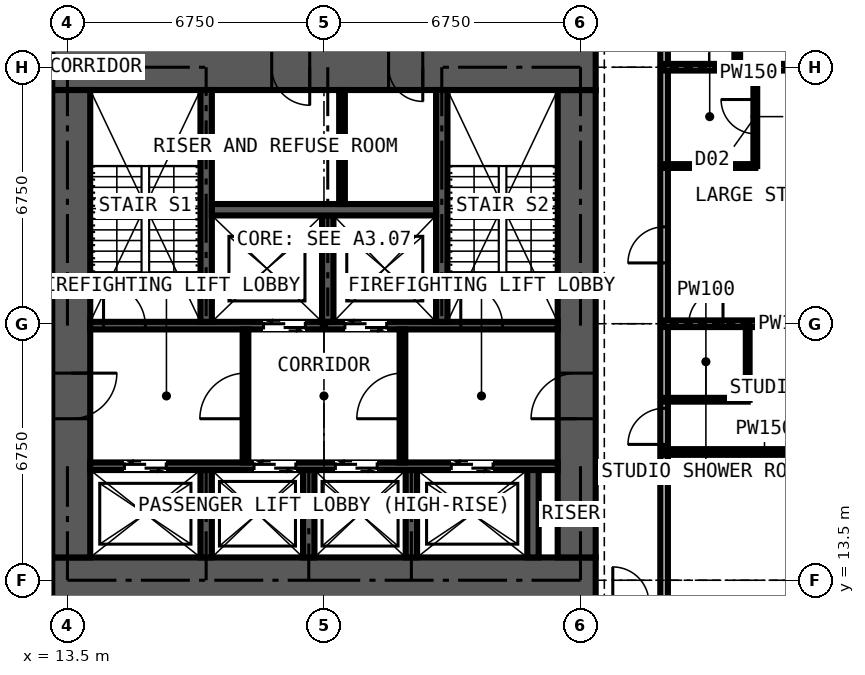
"""IFC4 building model, lengths in metres.
Left out: names, types, materials, properties, quantities, classifications, styles, units other than length and angle.
Written with IfcOpenShell. Run it as: python <this file> out.ifc"""

import sys

from ifc_helpers import new_model, si_unit, direction, frame, frame_2d, origin, place, context, subcontext, project, spatial, rectangle, extrude, element, fill, save


model = new_model("IFC4")
c1 = context("Model", 3, precision=1e-05, world=origin(), true_north=direction((0.0, 1.0)))
c2 = subcontext(c1, "Body", "Model", "MODEL_VIEW")
j1 = project(units=[si_unit("LENGTHUNIT", "METRE"), si_unit("PLANEANGLEUNIT", "RADIAN")], contexts=[c1])
p1 = place(None, origin())
s1 = spatial("IfcSite", under=j1, at=p1, CompositionType="ELEMENT")
p2 = place(p1, origin())
s2 = spatial("IfcBuilding", under=s1, at=p2, CompositionType="ELEMENT")
p3 = place(p2, frame((0.0, 0.0, 178.2)))
s3 = spatial("IfcBuildingStorey", under=s2, at=p3, CompositionType="ELEMENT", Elevation=178.2)
p4 = place(p3, frame((13.1, 13.5, 0.0), z_axis=(0.0, 0.0, 1.0), x_axis=(1.0, 0.0, 0.0)))
e1 = element("IfcWall", 1, at=p4, inside=s3, PredefinedType="SHEAR", context=c2, shape_type="SweptSolid", body=[
    extrude(rectangle(XDim=14.3, YDim=1.2, at=frame_2d((7.15, 0.0))), origin(), (0.0, 0.0, 1.0), 3.6),
])
p5 = place(p3, frame((26.9, 14.1, 0.0), z_axis=(0.0, 0.0, 1.0), x_axis=(0.0, 1.0, 0.0)))
e2 = element("IfcWall", 2, at=p5, inside=s3, PredefinedType="SHEAR", context=c2, shape_type="SweptSolid", body=[
    extrude(rectangle(XDim=12.3, YDim=1.0, at=frame_2d((6.15, 0.0))), origin(), (0.0, 0.0, 1.0), 3.6),
])
p6 = place(p5, frame((3.65, 0.0, 0.0)))
e3 = element("IfcOpeningElement", 3, at=p6, cuts=e2, PredefinedType="OPENING", context=c2, shape_type="SweptSolid", body=[
    extrude(rectangle(XDim=1.2, YDim=2.2, at=frame_2d((0.6, 1.1))), frame((0.0, 0.51, 0.0), z_axis=(0.0, -1.0, 0.0), x_axis=(1.0, 0.0, 0.0)), (0.0, 0.0, 1.0), 1.02),
])
p7 = place(p3, frame((27.4, 27.0, 0.0), z_axis=(0.0, 0.0, 1.0), x_axis=(-1.0, 0.0, 0.0)))
e4 = element("IfcWall", 4, at=p7, inside=s3, PredefinedType="SHEAR", context=c2, shape_type="SweptSolid", body=[
    extrude(rectangle(XDim=14.3, YDim=1.2, at=frame_2d((7.15, 0.0))), origin(), (0.0, 0.0, 1.0), 3.6),
])
p8 = place(p7, frame((4.55, 0.0, 0.0)))
e5 = element("IfcOpeningElement", 5, at=p8, cuts=e4, PredefinedType="OPENING", context=c2, shape_type="SweptSolid", body=[
    extrude(rectangle(XDim=0.9, YDim=2.2, at=frame_2d((0.45, 1.1))), frame((0.0, 0.61, 0.0), z_axis=(0.0, -1.0, 0.0), x_axis=(1.0, 0.0, 0.0)), (0.0, 0.0, 1.0), 1.22),
])
p9 = place(p7, frame((7.525, 0.0, 0.0)))
e6 = element("IfcOpeningElement", 6, at=p9, cuts=e4, PredefinedType="OPENING", context=c2, shape_type="SweptSolid", body=[
    extrude(rectangle(XDim=1.0, YDim=2.2, at=frame_2d((0.5, 1.1))), frame((0.0, 0.61, 0.0), z_axis=(0.0, -1.0, 0.0), x_axis=(1.0, 0.0, 0.0)), (0.0, 0.0, 1.0), 1.22),
])
p10 = place(p3, frame((13.6, 26.4, 0.0), z_axis=(0.0, 0.0, 1.0), x_axis=(0.0, -1.0, 0.0)))
e7 = element("IfcWall", 7, at=p10, inside=s3, PredefinedType="SHEAR", context=c2, shape_type="SweptSolid", body=[
    extrude(rectangle(XDim=12.3, YDim=1.0, at=frame_2d((6.15, 0.0))), origin(), (0.0, 0.0, 1.0), 3.6),
])
p11 = place(p10, frame((7.45, 0.0, 0.0)))
e8 = element("IfcOpeningElement", 8, at=p11, cuts=e7, PredefinedType="OPENING", context=c2, shape_type="SweptSolid", body=[
    extrude(rectangle(XDim=1.2, YDim=2.2, at=frame_2d((0.6, 1.1))), frame((0.0, 0.51, 0.0), z_axis=(0.0, -1.0, 0.0), x_axis=(1.0, 0.0, 0.0)), (0.0, 0.0, 1.0), 1.02),
])
p12 = place(p3, frame((14.1, 16.5, 0.0), z_axis=(0.0, 0.0, 1.0), x_axis=(1.0, 0.0, 0.0)))
e9 = element("IfcWall", 9, at=p12, inside=s3, PredefinedType="SHEAR", context=c2, shape_type="SweptSolid", body=[
    extrude(rectangle(XDim=12.3, YDim=0.2, at=frame_2d((6.15, 0.0))), origin(), (0.0, 0.0, 1.0), 3.6),
])
p13 = place(p12, frame((0.9, 0.0, 0.0)))
e10 = element("IfcOpeningElement", 10, at=p13, cuts=e9, PredefinedType="OPENING", context=c2, shape_type="SweptSolid", body=[
    extrude(rectangle(XDim=1.1, YDim=2.2, at=frame_2d((0.55, 1.1))), frame((0.0, 0.11, 0.0), z_axis=(0.0, -1.0, 0.0), x_axis=(1.0, 0.0, 0.0)), (0.0, 0.0, 1.0), 0.22),
])
p14 = place(p12, frame((4.31, 0.0, 0.0)))
e11 = element("IfcOpeningElement", 11, at=p14, cuts=e9, PredefinedType="OPENING", context=c2, shape_type="SweptSolid", body=[
    extrude(rectangle(XDim=1.1, YDim=2.2, at=frame_2d((0.55, 1.1))), frame((0.0, 0.11, 0.0), z_axis=(0.0, -1.0, 0.0), x_axis=(1.0, 0.0, 0.0)), (0.0, 0.0, 1.0), 0.22),
])
p15 = place(p12, frame((6.45, 0.0, 0.0)))
e12 = element("IfcOpeningElement", 12, at=p15, cuts=e9, PredefinedType="OPENING", context=c2, shape_type="SweptSolid", body=[
    extrude(rectangle(XDim=1.1, YDim=2.2, at=frame_2d((0.55, 1.1))), frame((0.0, 0.11, 0.0), z_axis=(0.0, -1.0, 0.0), x_axis=(1.0, 0.0, 0.0)), (0.0, 0.0, 1.0), 0.22),
])
p16 = place(p12, frame((9.5, 0.0, 0.0)))
e13 = element("IfcOpeningElement", 13, at=p16, cuts=e9, PredefinedType="OPENING", context=c2, shape_type="SweptSolid", body=[
    extrude(rectangle(XDim=1.1, YDim=2.2, at=frame_2d((0.55, 1.1))), frame((0.0, 0.11, 0.0), z_axis=(0.0, -1.0, 0.0), x_axis=(1.0, 0.0, 0.0)), (0.0, 0.0, 1.0), 0.22),
])
p17 = place(p3, frame((14.1, 20.2, 0.0), z_axis=(0.0, 0.0, 1.0), x_axis=(1.0, 0.0, 0.0)))
e14 = element("IfcWall", 14, at=p17, inside=s3, PredefinedType="SHEAR", context=c2, shape_type="SweptSolid", body=[
    extrude(rectangle(XDim=12.3, YDim=0.2, at=frame_2d((6.15, 0.0))), origin(), (0.0, 0.0, 1.0), 3.6),
])
p18 = place(p17, frame((4.56, 0.0, 0.0)))
e15 = element("IfcOpeningElement", 15, at=p18, cuts=e14, PredefinedType="OPENING", context=c2, shape_type="SweptSolid", body=[
    extrude(rectangle(XDim=1.1, YDim=2.2, at=frame_2d((0.55, 1.1))), frame((0.0, 0.11, 0.0), z_axis=(0.0, -1.0, 0.0), x_axis=(1.0, 0.0, 0.0)), (0.0, 0.0, 1.0), 0.22),
])
p19 = place(p17, frame((6.7, 0.0, 0.0)))
e16 = element("IfcOpeningElement", 16, at=p19, cuts=e14, PredefinedType="OPENING", context=c2, shape_type="SweptSolid", body=[
    extrude(rectangle(XDim=1.1, YDim=2.2, at=frame_2d((0.55, 1.1))), frame((0.0, 0.11, 0.0), z_axis=(0.0, -1.0, 0.0), x_axis=(1.0, 0.0, 0.0)), (0.0, 0.0, 1.0), 0.22),
])
p20 = place(p17, frame((0.35, 0.0, 0.0)))
e17 = element("IfcOpeningElement", 17, at=p20, cuts=e14, PredefinedType="OPENING", context=c2, shape_type="SweptSolid", body=[
    extrude(rectangle(XDim=1.1, YDim=2.2, at=frame_2d((0.55, 1.1))), frame((0.0, 0.11, 0.0), z_axis=(0.0, -1.0, 0.0), x_axis=(1.0, 0.0, 0.0)), (0.0, 0.0, 1.0), 0.22),
])
p21 = place(p17, frame((9.75, 0.0, 0.0)))
e18 = element("IfcOpeningElement", 18, at=p21, cuts=e14, PredefinedType="OPENING", context=c2, shape_type="SweptSolid", body=[
    extrude(rectangle(XDim=1.1, YDim=2.2, at=frame_2d((0.55, 1.1))), frame((0.0, 0.11, 0.0), z_axis=(0.0, -1.0, 0.0), x_axis=(1.0, 0.0, 0.0)), (0.0, 0.0, 1.0), 0.22),
])
for number, where, z_axis, x_axis in (
    (19, (17.15, 20.3, 0.0), (0.0, 0.0, 1.0), (0.0, 1.0, 0.0)),
    (20, (23.35, 20.3, 0.0), (0.0, 0.0, 1.0), (0.0, 1.0, 0.0)),
):
    element("IfcWall", number, at=place(p3, frame(where, z_axis=z_axis, x_axis=x_axis)), inside=s3, PredefinedType="SHEAR", context=c2, shape_type="SweptSolid", body=[
        extrude(rectangle(XDim=6.1, YDim=0.3, at=frame_2d((3.05, 0.0))), origin(), (0.0, 0.0, 1.0), 3.6),
    ])
p22 = place(p3, frame((20.35, 20.3, 0.0), z_axis=(0.0, 0.0, 1.0), x_axis=(0.0, 1.0, 0.0)))
e21 = element("IfcWall", 21, at=p22, inside=s3, PredefinedType="SHEAR", context=c2, shape_type="SweptSolid", body=[
    extrude(rectangle(XDim=2.8, YDim=0.3, at=frame_2d((1.4, 0.0))), origin(), (0.0, 0.0, 1.0), 3.6),
])
p23 = place(p3, frame((17.3, 23.25, 0.0), z_axis=(0.0, 0.0, 1.0), x_axis=(1.0, 0.0, 0.0)))
e22 = element("IfcWall", 22, at=p23, inside=s3, PredefinedType="SHEAR", context=c2, shape_type="SweptSolid", body=[
    extrude(rectangle(XDim=5.9, YDim=0.3, at=frame_2d((2.95, 0.0))), origin(), (0.0, 0.0, 1.0), 3.6),
])
for number, where, z_axis, x_axis in (
    (23, (17.15, 14.1, 0.0), (0.0, 0.0, 1.0), (0.0, 1.0, 0.0)),
    (24, (19.85, 14.1, 0.0), (0.0, 0.0, 1.0), (0.0, 1.0, 0.0)),
    (25, (22.55, 14.1, 0.0), (0.0, 0.0, 1.0), (0.0, 1.0, 0.0)),
    (26, (25.75, 14.1, 0.0), (0.0, 0.0, 1.0), (0.0, 1.0, 0.0)),
):
    element("IfcWall", number, at=place(p3, frame(where, z_axis=z_axis, x_axis=x_axis)), inside=s3, PredefinedType="SHEAR", context=c2, shape_type="SweptSolid", body=[
        extrude(rectangle(XDim=2.3, YDim=0.3, at=frame_2d((1.15, 0.0))), origin(), (0.0, 0.0, 1.0), 3.6),
    ])
p24 = place(p3, frame((18.185, 16.6, 0.0), z_axis=(0.0, 0.0, 1.0), x_axis=(0.0, 1.0, 0.0)))
e27 = element("IfcWall", 27, at=p24, inside=s3, PredefinedType="PARTITIONING", context=c2, shape_type="SweptSolid", body=[
    extrude(rectangle(XDim=3.5, YDim=0.15, at=frame_2d((1.75, 0.0))), origin(), (0.0, 0.0, 1.0), 3.375),
])
p25 = place(p24, frame((1.15, 0.0, 0.0)))
e28 = element("IfcOpeningElement", 28, at=p25, cuts=e27, PredefinedType="OPENING", context=c2, shape_type="SweptSolid", body=[
    extrude(rectangle(XDim=1.2, YDim=2.2, at=frame_2d((0.6, 1.1))), frame((0.0, 0.085, 0.0), z_axis=(0.0, -1.0, 0.0), x_axis=(1.0, 0.0, 0.0)), (0.0, 0.0, 1.0), 0.17),
])
p26 = place(p3, frame((22.315, 16.6, 0.0), z_axis=(0.0, 0.0, 1.0), x_axis=(0.0, 1.0, 0.0)))
e29 = element("IfcWall", 29, at=p26, inside=s3, PredefinedType="PARTITIONING", context=c2, shape_type="SweptSolid", body=[
    extrude(rectangle(XDim=3.5, YDim=0.15, at=frame_2d((1.75, 0.0))), origin(), (0.0, 0.0, 1.0), 3.375),
])
p27 = place(p26, frame((1.15, 0.0, 0.0)))
e30 = element("IfcOpeningElement", 30, at=p27, cuts=e29, PredefinedType="OPENING", context=c2, shape_type="SweptSolid", body=[
    extrude(rectangle(XDim=1.2, YDim=2.2, at=frame_2d((0.6, 1.1))), frame((0.0, 0.085, 0.0), z_axis=(0.0, -1.0, 0.0), x_axis=(1.0, 0.0, 0.0)), (0.0, 0.0, 1.0), 0.17),
])
p28 = place(p3, frame((20.725, 23.4, 0.0), z_axis=(0.0, 0.0, 1.0), x_axis=(0.0, 1.0, 0.0)))
e31 = element("IfcWall", 31, at=p28, inside=s3, PredefinedType="PARTITIONING", context=c2, shape_type="SweptSolid", body=[
    extrude(rectangle(XDim=3.0, YDim=0.15, at=frame_2d((1.5, 0.0))), origin(), (0.0, 0.0, 1.0), 3.375),
])
p29 = place(p3, frame((29.2, 11.3, 0.0), z_axis=(0.0, 0.0, 1.0), x_axis=(0.0, 1.0, 0.0)))
e32 = element("IfcWall", 32, at=p29, inside=s3, PredefinedType="PARTITIONING", context=c2, shape_type="SweptSolid", body=[
    extrude(rectangle(XDim=17.9, YDim=0.2, at=frame_2d((8.95, 0.0))), origin(), (0.0, 0.0, 1.0), 3.375),
])
p30 = place(p29, frame((10.55, 0.0, 0.0)))
e33 = element("IfcOpeningElement", 33, at=p30, cuts=e32, PredefinedType="OPENING", context=c2, shape_type="SweptSolid", body=[
    extrude(rectangle(XDim=0.95, YDim=2.2, at=frame_2d((0.475, 1.1))), frame((0.0, 0.11, 0.0), z_axis=(0.0, -1.0, 0.0), x_axis=(1.0, 0.0, 0.0)), (0.0, 0.0, 1.0), 0.22),
])
p31 = place(p29, frame((5.775, 0.0, 0.0)))
e34 = element("IfcOpeningElement", 34, at=p31, cuts=e32, PredefinedType="OPENING", context=c2, shape_type="SweptSolid", body=[
    extrude(rectangle(XDim=0.95, YDim=2.2, at=frame_2d((0.475, 1.1))), frame((0.0, 0.11, 0.0), z_axis=(0.0, -1.0, 0.0), x_axis=(1.0, 0.0, 0.0)), (0.0, 0.0, 1.0), 0.22),
])
p32 = place(p29, frame((16.3, 0.0, 0.0)))
e35 = element("IfcOpeningElement", 35, at=p32, cuts=e32, PredefinedType="OPENING", context=c2, shape_type="SweptSolid", body=[
    extrude(rectangle(XDim=1.0, YDim=2.2, at=frame_2d((0.5, 1.1))), frame((0.0, 0.11, 0.0), z_axis=(0.0, -1.0, 0.0), x_axis=(1.0, 0.0, 0.0)), (0.0, 0.0, 1.0), 0.22),
])
p33 = place(p3, frame((29.2, 16.875, 0.0), z_axis=(0.0, 0.0, 1.0), x_axis=(1.0, 0.0, 0.0)))
e36 = element("IfcWall", 36, at=p33, inside=s3, PredefinedType="PARTITIONING", context=c2, shape_type="SweptSolid", body=[
    extrude(rectangle(XDim=5.284, YDim=0.15, at=frame_2d((2.642, 0.0))), origin(), (0.0, 0.0, 1.0), 3.375),
])
p34 = place(p3, frame((29.2, 18.25, 0.0), z_axis=(0.0, 0.0, 1.0), x_axis=(1.0, 0.0, 0.0)))
e37 = element("IfcWall", 37, at=p34, inside=s3, PredefinedType="PARTITIONING", context=c2, shape_type="SweptSolid", body=[
    extrude(rectangle(XDim=2.2, YDim=0.1, at=frame_2d((1.1, 0.0))), origin(), (0.0, 0.0, 1.0), 3.375),
])
p35 = place(p3, frame((29.2, 20.25, 0.0), z_axis=(0.0, 0.0, 1.0), x_axis=(1.0, 0.0, 0.0)))
e38 = element("IfcWall", 38, at=p35, inside=s3, PredefinedType="PARTITIONING", context=c2, shape_type="SweptSolid", body=[
    extrude(rectangle(XDim=5.284, YDim=0.175, at=frame_2d((2.642, 0.0))), origin(), (0.0, 0.0, 1.0), 2.806),
])
p36 = place(p35, frame((0.65, 0.0, 0.0)))
e39 = element("IfcOpeningElement", 39, at=p36, cuts=e38, PredefinedType="OPENING", context=c2, shape_type="SweptSolid", body=[
    extrude(rectangle(XDim=0.9, YDim=2.2, at=frame_2d((0.45, 1.1))), frame((0.0, 0.097, 0.0), z_axis=(0.0, -1.0, 0.0), x_axis=(1.0, 0.0, 0.0)), (0.0, 0.0, 1.0), 0.195),
])
p37 = place(p3, frame((29.2, 24.4, 0.0), z_axis=(0.0, 0.0, 1.0), x_axis=(1.0, 0.0, 0.0)))
e40 = element("IfcWall", 40, at=p37, inside=s3, PredefinedType="PARTITIONING", context=c2, shape_type="SweptSolid", body=[
    extrude(rectangle(XDim=2.4, YDim=0.1, at=frame_2d((1.2, 0.0))), origin(), (0.0, 0.0, 1.0), 3.375),
])
p38 = place(p3, frame((29.2, 27.0, 0.0), z_axis=(0.0, 0.0, 1.0), x_axis=(1.0, 0.0, 0.0)))
e41 = element("IfcWall", 41, at=p38, inside=s3, PredefinedType="PARTITIONING", context=c2, shape_type="SweptSolid", body=[
    extrude(rectangle(XDim=5.284, YDim=0.175, at=frame_2d((2.642, 0.0))), origin(), (0.0, 0.0, 1.0), 2.806),
])
p39 = place(p3, frame((31.125, 27.0, 0.0), z_axis=(0.0, 0.0, 1.0), x_axis=(0.0, 1.0, 0.0)))
e42 = element("IfcWall", 42, at=p39, inside=s3, PredefinedType="PARTITIONING", context=c2, shape_type="SweptSolid", body=[
    extrude(rectangle(XDim=0.734, YDim=0.15, at=frame_2d((0.367, 0.0))), origin(), (0.0, 0.0, 1.0), 3.375),
])
p40 = place(p3, frame((31.4, 18.25, 0.0), z_axis=(0.0, 0.0, 1.0), x_axis=(0.0, 1.0, 0.0)))
e43 = element("IfcWall", 43, at=p40, inside=s3, PredefinedType="PARTITIONING", context=c2, shape_type="SweptSolid", body=[
    extrude(rectangle(XDim=2.0, YDim=0.1, at=frame_2d((1.0, 0.0))), origin(), (0.0, 0.0, 1.0), 3.375),
])
p41 = place(p3, frame((31.6, 24.4, 0.0), z_axis=(0.0, 0.0, 1.0), x_axis=(0.0, 1.0, 0.0)))
e44 = element("IfcWall", 44, at=p41, inside=s3, PredefinedType="PARTITIONING", context=c2, shape_type="SweptSolid", body=[
    extrude(rectangle(XDim=2.6, YDim=0.1, at=frame_2d((1.3, 0.0))), origin(), (0.0, 0.0, 1.0), 3.375),
])
p42 = place(p41, frame((0.85, 0.0, 0.0)))
e45 = element("IfcOpeningElement", 45, at=p42, cuts=e44, PredefinedType="OPENING", context=c2, shape_type="SweptSolid", body=[
    extrude(rectangle(XDim=0.9, YDim=2.2, at=frame_2d((0.45, 1.1))), frame((0.0, 0.06, 0.0), z_axis=(0.0, -1.0, 0.0), x_axis=(1.0, 0.0, 0.0)), (0.0, 0.0, 1.0), 0.12),
])
p43 = place(p13, origin())
e46 = element("IfcDoor", 46, at=p43, inside=s3, OperationType="DOUBLE_DOOR_SLIDING", PredefinedType="DOOR", context=c2, shape_type="SweptSolid", body=[
    extrude(rectangle(XDim=1.1, YDim=2.2, at=frame_2d((0.55, 1.1))), frame((0.0, 0.025, 0.0), z_axis=(0.0, -1.0, 0.0), x_axis=(1.0, 0.0, 0.0)), (0.0, 0.0, 1.0), 0.05),
])
fill(e10, e46)
p44 = place(p14, origin())
e47 = element("IfcDoor", 47, at=p44, inside=s3, OperationType="DOUBLE_DOOR_SLIDING", PredefinedType="DOOR", context=c2, shape_type="SweptSolid", body=[
    extrude(rectangle(XDim=1.1, YDim=2.2, at=frame_2d((0.55, 1.1))), frame((0.0, 0.025, 0.0), z_axis=(0.0, -1.0, 0.0), x_axis=(1.0, 0.0, 0.0)), (0.0, 0.0, 1.0), 0.05),
])
fill(e11, e47)
p45 = place(p15, origin())
e48 = element("IfcDoor", 48, at=p45, inside=s3, OperationType="DOUBLE_DOOR_SLIDING", PredefinedType="DOOR", context=c2, shape_type="SweptSolid", body=[
    extrude(rectangle(XDim=1.1, YDim=2.2, at=frame_2d((0.55, 1.1))), frame((0.0, 0.025, 0.0), z_axis=(0.0, -1.0, 0.0), x_axis=(1.0, 0.0, 0.0)), (0.0, 0.0, 1.0), 0.05),
])
fill(e12, e48)
p46 = place(p16, origin())
e49 = element("IfcDoor", 49, at=p46, inside=s3, OperationType="DOUBLE_DOOR_SLIDING", PredefinedType="DOOR", context=c2, shape_type="SweptSolid", body=[
    extrude(rectangle(XDim=1.1, YDim=2.2, at=frame_2d((0.55, 1.1))), frame((0.0, 0.025, 0.0), z_axis=(0.0, -1.0, 0.0), x_axis=(1.0, 0.0, 0.0)), (0.0, 0.0, 1.0), 0.05),
])
fill(e13, e49)
p47 = place(p18, origin())
e50 = element("IfcDoor", 50, at=p47, inside=s3, OperationType="DOUBLE_DOOR_SLIDING", PredefinedType="DOOR", context=c2, shape_type="SweptSolid", body=[
    extrude(rectangle(XDim=1.1, YDim=2.2, at=frame_2d((0.55, 1.1))), frame((0.0, 0.025, 0.0), z_axis=(0.0, -1.0, 0.0), x_axis=(1.0, 0.0, 0.0)), (0.0, 0.0, 1.0), 0.05),
])
fill(e15, e50)
p48 = place(p19, origin())
e51 = element("IfcDoor", 51, at=p48, inside=s3, OperationType="DOUBLE_DOOR_SLIDING", PredefinedType="DOOR", context=c2, shape_type="SweptSolid", body=[
    extrude(rectangle(XDim=1.1, YDim=2.2, at=frame_2d((0.55, 1.1))), frame((0.0, 0.025, 0.0), z_axis=(0.0, -1.0, 0.0), x_axis=(1.0, 0.0, 0.0)), (0.0, 0.0, 1.0), 0.05),
])
fill(e16, e51)
p49 = place(p11, origin())
e52 = element("IfcDoor", 52, at=p49, inside=s3, OperationType="DOUBLE_DOOR_SINGLE_SWING", PredefinedType="DOOR", context=c2, shape_type="SweptSolid", body=[
    extrude(rectangle(XDim=1.2, YDim=2.2, at=frame_2d((0.6, 1.1))), frame((0.0, 0.025, 0.0), z_axis=(0.0, -1.0, 0.0), x_axis=(1.0, 0.0, 0.0)), (0.0, 0.0, 1.0), 0.05),
])
fill(e8, e52)
p50 = place(p6, origin())
e53 = element("IfcDoor", 53, at=p50, inside=s3, OperationType="DOUBLE_DOOR_SINGLE_SWING", PredefinedType="DOOR", context=c2, shape_type="SweptSolid", body=[
    extrude(rectangle(XDim=1.2, YDim=2.2, at=frame_2d((0.6, 1.1))), frame((0.0, 0.025, 0.0), z_axis=(0.0, -1.0, 0.0), x_axis=(1.0, 0.0, 0.0)), (0.0, 0.0, 1.0), 0.05),
])
fill(e3, e53)
p51 = place(p25, origin())
e54 = element("IfcDoor", 54, at=p51, inside=s3, OperationType="DOUBLE_DOOR_SINGLE_SWING", PredefinedType="DOOR", context=c2, shape_type="SweptSolid", body=[
    extrude(rectangle(XDim=1.2, YDim=2.2, at=frame_2d((0.6, 1.1))), frame((0.0, 0.025, 0.0), z_axis=(0.0, -1.0, 0.0), x_axis=(1.0, 0.0, 0.0)), (0.0, 0.0, 1.0), 0.05),
])
fill(e28, e54)
p52 = place(p27, origin())
e55 = element("IfcDoor", 55, at=p52, inside=s3, OperationType="DOUBLE_DOOR_SINGLE_SWING", PredefinedType="DOOR", context=c2, shape_type="SweptSolid", body=[
    extrude(rectangle(XDim=1.2, YDim=2.2, at=frame_2d((0.6, 1.1))), frame((0.0, 0.025, 0.0), z_axis=(0.0, -1.0, 0.0), x_axis=(1.0, 0.0, 0.0)), (0.0, 0.0, 1.0), 0.05),
])
fill(e30, e55)
p53 = place(p8, origin())
e56 = element("IfcDoor", 56, at=p53, inside=s3, OperationType="SINGLE_SWING_LEFT", PredefinedType="DOOR", context=c2, shape_type="SweptSolid", body=[
    extrude(rectangle(XDim=0.9, YDim=2.2, at=frame_2d((0.45, 1.1))), frame((0.0, 0.4, 0.0), z_axis=(0.0, -1.0, 0.0), x_axis=(1.0, 0.0, 0.0)), (0.0, 0.0, 1.0), 0.8),
])
fill(e5, e56)
p54 = place(p9, origin())
e57 = element("IfcDoor", 57, at=p54, inside=s3, OperationType="SINGLE_SWING_LEFT", PredefinedType="DOOR", context=c2, shape_type="SweptSolid", body=[
    extrude(rectangle(XDim=1.0, YDim=2.2, at=frame_2d((0.5, 1.1))), frame((0.0, 0.025, 0.0), z_axis=(0.0, -1.0, 0.0), x_axis=(1.0, 0.0, 0.0)), (0.0, 0.0, 1.0), 0.05),
])
fill(e6, e57)
p55 = place(p20, origin())
e58 = element("IfcDoor", 58, at=p55, inside=s3, OperationType="SINGLE_SWING_LEFT", PredefinedType="DOOR", context=c2, shape_type="SweptSolid", body=[
    extrude(rectangle(XDim=1.1, YDim=2.2, at=frame_2d((0.55, 1.1))), frame((0.0, 0.025, 0.0), z_axis=(0.0, -1.0, 0.0), x_axis=(1.0, 0.0, 0.0)), (0.0, 0.0, 1.0), 0.05),
])
fill(e17, e58)
p56 = place(p21, origin())
e59 = element("IfcDoor", 59, at=p56, inside=s3, OperationType="SINGLE_SWING_LEFT", PredefinedType="DOOR", context=c2, shape_type="SweptSolid", body=[
    extrude(rectangle(XDim=1.1, YDim=2.2, at=frame_2d((0.55, 1.1))), frame((0.0, 0.025, 0.0), z_axis=(0.0, -1.0, 0.0), x_axis=(1.0, 0.0, 0.0)), (0.0, 0.0, 1.0), 0.05),
])
fill(e18, e59)
p57 = place(p30, origin())
e60 = element("IfcDoor", 60, at=p57, inside=s3, OperationType="SINGLE_SWING_LEFT", PredefinedType="DOOR", context=c2, shape_type="SweptSolid", body=[
    extrude(rectangle(XDim=0.95, YDim=2.2, at=frame_2d((0.475, 1.1))), frame((0.0, 0.025, 0.0), z_axis=(0.0, -1.0, 0.0), x_axis=(1.0, 0.0, 0.0)), (0.0, 0.0, 1.0), 0.05),
])
fill(e33, e60)
p58 = place(p42, origin())
e61 = element("IfcDoor", 61, at=p58, inside=s3, OperationType="SINGLE_SWING_RIGHT", PredefinedType="DOOR", context=c2, shape_type="SweptSolid", body=[
    extrude(rectangle(XDim=0.9, YDim=2.2, at=frame_2d((0.45, 1.1))), frame((0.0, 0.025, 0.0), z_axis=(0.0, -1.0, 0.0), x_axis=(1.0, 0.0, 0.0)), (0.0, 0.0, 1.0), 0.05),
])
fill(e45, e61)
p59 = place(p31, origin())
e62 = element("IfcDoor", 62, at=p59, inside=s3, OperationType="SINGLE_SWING_LEFT", PredefinedType="DOOR", context=c2, shape_type="SweptSolid", body=[
    extrude(rectangle(XDim=0.95, YDim=2.2, at=frame_2d((0.475, 1.1))), frame((0.0, 0.025, 0.0), z_axis=(0.0, -1.0, 0.0), x_axis=(1.0, 0.0, 0.0)), (0.0, 0.0, 1.0), 0.05),
])
fill(e34, e62)
p60 = place(p36, origin())
e63 = element("IfcDoor", 63, at=p60, inside=s3, OperationType="SINGLE_SWING_RIGHT", PredefinedType="DOOR", context=c2, shape_type="SweptSolid", body=[
    extrude(rectangle(XDim=0.9, YDim=2.2, at=frame_2d((0.45, 1.1))), frame((0.0, 0.025, 0.0), z_axis=(0.0, -1.0, 0.0), x_axis=(1.0, 0.0, 0.0)), (0.0, 0.0, 1.0), 0.05),
])
fill(e39, e63)
save(model, sys.argv[1])
